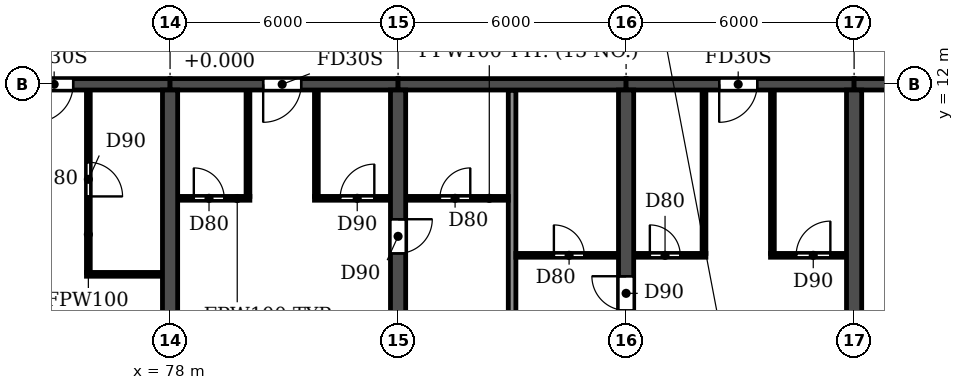
"""IFC4 building model, lengths in metres.
Left out: names, types, materials, properties, quantities, classifications, styles, units other than length and angle.
Written with IfcOpenShell. Run it as: python <this file> out.ifc"""

import sys

from ifc_helpers import new_model, si_unit, direction, frame, frame_2d, origin, place, context, subcontext, project, spatial, rectangle, extrude, element, fill, save


model = new_model("IFC4")
c1 = context("Model", 3, precision=1e-05, world=origin(), true_north=direction((0.0, 1.0)))
c2 = subcontext(c1, "Body", "Model", "MODEL_VIEW")
j1 = project(units=[si_unit("LENGTHUNIT", "METRE"), si_unit("PLANEANGLEUNIT", "RADIAN")], contexts=[c1])
p1 = place(None, origin())
s1 = spatial("IfcSite", under=j1, at=p1, CompositionType="ELEMENT")
p2 = place(p1, origin())
s2 = spatial("IfcBuilding", under=s1, at=p2, CompositionType="ELEMENT")
p3 = place(p2, frame((0.0, 0.0, 33.3)))
s3 = spatial("IfcBuildingStorey", under=s2, at=p3, CompositionType="ELEMENT", Elevation=33.3)
p4 = place(p3, frame((78.0, 0.2, 0.0), z_axis=(0.0, 0.0, 1.0), x_axis=(0.0, 1.0, 0.0)))
e1 = element("IfcWall", 1, at=p4, inside=s3, PredefinedType="SHEAR", context=c2, shape_type="SweptSolid", body=[
    extrude(rectangle(XDim=11.65, YDim=0.4, at=frame_2d((5.825, 0.0))), origin(), (0.0, 0.0, 1.0), 3.05),
])
p5 = place(p3, frame((84.0, 0.2, 0.0), z_axis=(0.0, 0.0, 1.0), x_axis=(0.0, 1.0, 0.0)))
e2 = element("IfcWall", 2, at=p5, inside=s3, PredefinedType="SHEAR", context=c2, shape_type="SweptSolid", body=[
    extrude(rectangle(XDim=11.65, YDim=0.4, at=frame_2d((5.825, 0.0))), origin(), (0.0, 0.0, 1.0), 3.05),
])
p6 = place(p5, frame((7.35, 0.0, 0.0)))
e3 = element("IfcOpeningElement", 3, at=p6, cuts=e2, PredefinedType="OPENING", context=c2, shape_type="SweptSolid", body=[
    extrude(rectangle(XDim=0.9, YDim=2.1, at=frame_2d((0.45, 1.05))), frame((0.0, 0.21, 0.0), z_axis=(0.0, -1.0, 0.0), x_axis=(1.0, 0.0, 0.0)), (0.0, 0.0, 1.0), 0.42),
])
p7 = place(p3, frame((90.0, 0.2, 0.0), z_axis=(0.0, 0.0, 1.0), x_axis=(0.0, 1.0, 0.0)))
e4 = element("IfcWall", 4, at=p7, inside=s3, PredefinedType="SHEAR", context=c2, shape_type="SweptSolid", body=[
    extrude(rectangle(XDim=11.65, YDim=0.4, at=frame_2d((5.825, 0.0))), origin(), (0.0, 0.0, 1.0), 3.05),
])
p8 = place(p7, frame((5.85, 0.0, 0.0)))
e5 = element("IfcOpeningElement", 5, at=p8, cuts=e4, PredefinedType="OPENING", context=c2, shape_type="SweptSolid", body=[
    extrude(rectangle(XDim=0.9, YDim=2.1, at=frame_2d((0.45, 1.05))), frame((0.0, 0.21, 0.0), z_axis=(0.0, -1.0, 0.0), x_axis=(1.0, 0.0, 0.0)), (0.0, 0.0, 1.0), 0.42),
])
p9 = place(p3, frame((96.0, 0.2, 0.0), z_axis=(0.0, 0.0, 1.0), x_axis=(0.0, 1.0, 0.0)))
e6 = element("IfcWall", 6, at=p9, inside=s3, PredefinedType="SHEAR", context=c2, shape_type="SweptSolid", body=[
    extrude(rectangle(XDim=11.65, YDim=0.4, at=frame_2d((5.825, 0.0))), origin(), (0.0, 0.0, 1.0), 3.05),
])
p10 = place(p3, frame((72.0, 12.0, 0.0), z_axis=(0.0, 0.0, 1.0), x_axis=(1.0, 0.0, 0.0)))
e7 = element("IfcWall", 7, at=p10, inside=s3, PredefinedType="SHEAR", context=c2, shape_type="SweptSolid", body=[
    extrude(rectangle(XDim=6.0, YDim=0.3, at=frame_2d((3.0, 0.0))), origin(), (0.0, 0.0, 1.0), 2.45),
])
p11 = place(p10, frame((2.45, 0.0, 0.0)))
e8 = element("IfcOpeningElement", 8, at=p11, cuts=e7, PredefinedType="OPENING", context=c2, shape_type="SweptSolid", body=[
    extrude(rectangle(XDim=1.0, YDim=2.1, at=frame_2d((0.5, 1.05))), frame((0.0, 0.16, 0.0), z_axis=(0.0, -1.0, 0.0), x_axis=(1.0, 0.0, 0.0)), (0.0, 0.0, 1.0), 0.32),
])
p12 = place(p3, frame((78.0, 12.0, 0.0), z_axis=(0.0, 0.0, 1.0), x_axis=(1.0, 0.0, 0.0)))
e9 = element("IfcWall", 9, at=p12, inside=s3, PredefinedType="SHEAR", context=c2, shape_type="SweptSolid", body=[
    extrude(rectangle(XDim=6.0, YDim=0.3, at=frame_2d((3.0, 0.0))), origin(), (0.0, 0.0, 1.0), 2.45),
])
p13 = place(p12, frame((2.45, 0.0, 0.0)))
e10 = element("IfcOpeningElement", 10, at=p13, cuts=e9, PredefinedType="OPENING", context=c2, shape_type="SweptSolid", body=[
    extrude(rectangle(XDim=1.0, YDim=2.1, at=frame_2d((0.5, 1.05))), frame((0.0, 0.16, 0.0), z_axis=(0.0, -1.0, 0.0), x_axis=(1.0, 0.0, 0.0)), (0.0, 0.0, 1.0), 0.32),
])
p14 = place(p3, frame((84.0, 12.0, 0.0), z_axis=(0.0, 0.0, 1.0), x_axis=(1.0, 0.0, 0.0)))
e11 = element("IfcWall", 11, at=p14, inside=s3, PredefinedType="SHEAR", context=c2, shape_type="SweptSolid", body=[
    extrude(rectangle(XDim=6.0, YDim=0.3, at=frame_2d((3.0, 0.0))), origin(), (0.0, 0.0, 1.0), 2.45),
])
p15 = place(p3, frame((90.0, 12.0, 0.0), z_axis=(0.0, 0.0, 1.0), x_axis=(1.0, 0.0, 0.0)))
e12 = element("IfcWall", 12, at=p15, inside=s3, PredefinedType="SHEAR", context=c2, shape_type="SweptSolid", body=[
    extrude(rectangle(XDim=6.0, YDim=0.3, at=frame_2d((3.0, 0.0))), origin(), (0.0, 0.0, 1.0), 2.45),
])
p16 = place(p15, frame((2.45, 0.0, 0.0)))
e13 = element("IfcOpeningElement", 13, at=p16, cuts=e12, PredefinedType="OPENING", context=c2, shape_type="SweptSolid", body=[
    extrude(rectangle(XDim=1.0, YDim=2.1, at=frame_2d((0.5, 1.05))), frame((0.0, 0.16, 0.0), z_axis=(0.0, -1.0, 0.0), x_axis=(1.0, 0.0, 0.0)), (0.0, 0.0, 1.0), 0.32),
])
p17 = place(p3, frame((96.0, 12.0, 0.0), z_axis=(0.0, 0.0, 1.0), x_axis=(1.0, 0.0, 0.0)))
e14 = element("IfcWall", 14, at=p17, inside=s3, PredefinedType="SHEAR", context=c2, shape_type="SweptSolid", body=[
    extrude(rectangle(XDim=5.8, YDim=0.3, at=frame_2d((2.9, 0.0))), origin(), (0.0, 0.0, 1.0), 2.45),
])
p18 = place(p17, frame((2.5, 0.0, 0.0)))
e15 = element("IfcOpeningElement", 15, at=p18, cuts=e14, PredefinedType="OPENING", context=c2, shape_type="SweptSolid", body=[
    extrude(rectangle(XDim=1.0, YDim=2.1, at=frame_2d((0.5, 1.05))), frame((0.0, 0.16, 0.0), z_axis=(0.0, -1.0, 0.0), x_axis=(1.0, 0.0, 0.0)), (0.0, 0.0, 1.0), 0.32),
])
p19 = place(p3, frame((87.0, 0.06, 0.0), z_axis=(0.0, 0.0, 1.0), x_axis=(0.0, 1.0, 0.0)))
e16 = element("IfcWall", 16, at=p19, inside=s3, PredefinedType="PARTITIONING", context=c2, shape_type="SweptSolid", body=[
    extrude(rectangle(XDim=11.78, YDim=0.2, at=frame_2d((5.89, 0.0))), origin(), (0.0, 0.0, 1.0), 3.05),
])
p20 = place(p3, frame((75.8, 7.0, 0.0), z_axis=(0.0, 0.0, 1.0), x_axis=(1.0, 0.0, 0.0)))
e17 = element("IfcWall", 17, at=p20, inside=s3, PredefinedType="PARTITIONING", context=c2, shape_type="SweptSolid", body=[
    extrude(rectangle(XDim=1.99, YDim=0.1, at=frame_2d((0.995, 0.0))), origin(), (0.0, 0.0, 1.0), 3.05),
])
p21 = place(p3, frame((87.1, 7.5, 0.0), z_axis=(0.0, 0.0, 1.0), x_axis=(1.0, 0.0, 0.0)))
e18 = element("IfcWall", 18, at=p21, inside=s3, PredefinedType="PARTITIONING", context=c2, shape_type="SweptSolid", body=[
    extrude(rectangle(XDim=2.69, YDim=0.1, at=frame_2d((1.345, 0.0))), origin(), (0.0, 0.0, 1.0), 3.05),
])
p22 = place(p21, frame((1.0, 0.0, 0.0)))
e19 = element("IfcOpeningElement", 19, at=p22, cuts=e18, PredefinedType="OPENING", context=c2, shape_type="SweptSolid", body=[
    extrude(rectangle(XDim=0.8, YDim=2.1, at=frame_2d((0.4, 1.05))), frame((0.0, 0.06, 0.0), z_axis=(0.0, -1.0, 0.0), x_axis=(1.0, 0.0, 0.0)), (0.0, 0.0, 1.0), 0.12),
])
p23 = place(p3, frame((90.21, 7.5, 0.0), z_axis=(0.0, 0.0, 1.0), x_axis=(1.0, 0.0, 0.0)))
e20 = element("IfcWall", 20, at=p23, inside=s3, PredefinedType="PARTITIONING", context=c2, shape_type="SweptSolid", body=[
    extrude(rectangle(XDim=1.89, YDim=0.1, at=frame_2d((0.945, 0.0))), origin(), (0.0, 0.0, 1.0), 3.05),
])
p24 = place(p23, frame((0.415, 0.0, 0.0)))
e21 = element("IfcOpeningElement", 21, at=p24, cuts=e20, PredefinedType="OPENING", context=c2, shape_type="SweptSolid", body=[
    extrude(rectangle(XDim=0.8, YDim=2.1, at=frame_2d((0.4, 1.05))), frame((0.0, 0.06, 0.0), z_axis=(0.0, -1.0, 0.0), x_axis=(1.0, 0.0, 0.0)), (0.0, 0.0, 1.0), 0.12),
])
p25 = place(p3, frame((93.8, 7.5, 0.0), z_axis=(0.0, 0.0, 1.0), x_axis=(1.0, 0.0, 0.0)))
e22 = element("IfcWall", 22, at=p25, inside=s3, PredefinedType="PARTITIONING", context=c2, shape_type="SweptSolid", body=[
    extrude(rectangle(XDim=1.99, YDim=0.1, at=frame_2d((0.995, 0.0))), origin(), (0.0, 0.0, 1.0), 3.05),
])
p26 = place(p25, frame((0.675, 0.0, 0.0)))
e23 = element("IfcOpeningElement", 23, at=p26, cuts=e22, PredefinedType="OPENING", context=c2, shape_type="SweptSolid", body=[
    extrude(rectangle(XDim=0.9, YDim=2.1, at=frame_2d((0.45, 1.05))), frame((0.0, 0.06, 0.0), z_axis=(0.0, -1.0, 0.0), x_axis=(1.0, 0.0, 0.0)), (0.0, 0.0, 1.0), 0.12),
])
p27 = place(p3, frame((78.21, 9.0, 0.0), z_axis=(0.0, 0.0, 1.0), x_axis=(1.0, 0.0, 0.0)))
e24 = element("IfcWall", 24, at=p27, inside=s3, PredefinedType="PARTITIONING", context=c2, shape_type="SweptSolid", body=[
    extrude(rectangle(XDim=1.89, YDim=0.1, at=frame_2d((0.945, 0.0))), origin(), (0.0, 0.0, 1.0), 3.05),
])
p28 = place(p27, frame((0.415, 0.0, 0.0)))
e25 = element("IfcOpeningElement", 25, at=p28, cuts=e24, PredefinedType="OPENING", context=c2, shape_type="SweptSolid", body=[
    extrude(rectangle(XDim=0.8, YDim=2.1, at=frame_2d((0.4, 1.05))), frame((0.0, 0.06, 0.0), z_axis=(0.0, -1.0, 0.0), x_axis=(1.0, 0.0, 0.0)), (0.0, 0.0, 1.0), 0.12),
])
p29 = place(p3, frame((81.8, 9.0, 0.0), z_axis=(0.0, 0.0, 1.0), x_axis=(1.0, 0.0, 0.0)))
e26 = element("IfcWall", 26, at=p29, inside=s3, PredefinedType="PARTITIONING", context=c2, shape_type="SweptSolid", body=[
    extrude(rectangle(XDim=1.99, YDim=0.1, at=frame_2d((0.995, 0.0))), origin(), (0.0, 0.0, 1.0), 3.05),
])
p30 = place(p29, frame((0.675, 0.0, 0.0)))
e27 = element("IfcOpeningElement", 27, at=p30, cuts=e26, PredefinedType="OPENING", context=c2, shape_type="SweptSolid", body=[
    extrude(rectangle(XDim=0.9, YDim=2.1, at=frame_2d((0.45, 1.05))), frame((0.0, 0.06, 0.0), z_axis=(0.0, -1.0, 0.0), x_axis=(1.0, 0.0, 0.0)), (0.0, 0.0, 1.0), 0.12),
])
p31 = place(p3, frame((84.21, 9.0, 0.0), z_axis=(0.0, 0.0, 1.0), x_axis=(1.0, 0.0, 0.0)))
e28 = element("IfcWall", 28, at=p31, inside=s3, PredefinedType="PARTITIONING", context=c2, shape_type="SweptSolid", body=[
    extrude(rectangle(XDim=2.69, YDim=0.1, at=frame_2d((1.345, 0.0))), origin(), (0.0, 0.0, 1.0), 3.05),
])
p32 = place(p31, frame((0.89, 0.0, 0.0)))
e29 = element("IfcOpeningElement", 29, at=p32, cuts=e28, PredefinedType="OPENING", context=c2, shape_type="SweptSolid", body=[
    extrude(rectangle(XDim=0.8, YDim=2.1, at=frame_2d((0.4, 1.05))), frame((0.0, 0.06, 0.0), z_axis=(0.0, -1.0, 0.0), x_axis=(1.0, 0.0, 0.0)), (0.0, 0.0, 1.0), 0.12),
])
p33 = place(p3, frame((75.85, 7.05, 0.0), z_axis=(0.0, 0.0, 1.0), x_axis=(0.0, 1.0, 0.0)))
e30 = element("IfcWall", 30, at=p33, inside=s3, PredefinedType="PARTITIONING", context=c2, shape_type="SweptSolid", body=[
    extrude(rectangle(XDim=4.79, YDim=0.1, at=frame_2d((2.395, 0.0))), origin(), (0.0, 0.0, 1.0), 3.05),
])
p34 = place(p33, frame((2.0, 0.0, 0.0)))
e31 = element("IfcOpeningElement", 31, at=p34, cuts=e30, PredefinedType="OPENING", context=c2, shape_type="SweptSolid", body=[
    extrude(rectangle(XDim=0.9, YDim=2.1, at=frame_2d((0.45, 1.05))), frame((0.0, 0.06, 0.0), z_axis=(0.0, -1.0, 0.0), x_axis=(1.0, 0.0, 0.0)), (0.0, 0.0, 1.0), 0.12),
])
for number, where, z_axis, x_axis in (
    (32, (80.05, 9.05, 0.0), (0.0, 0.0, 1.0), (0.0, 1.0, 0.0)),
    (33, (81.85, 9.05, 0.0), (0.0, 0.0, 1.0), (0.0, 1.0, 0.0)),
):
    element("IfcWall", number, at=place(p3, frame(where, z_axis=z_axis, x_axis=x_axis)), inside=s3, PredefinedType="PARTITIONING", context=c2, shape_type="SweptSolid", body=[
        extrude(rectangle(XDim=2.79, YDim=0.1, at=frame_2d((1.395, 0.0))), origin(), (0.0, 0.0, 1.0), 3.05),
    ])
for number, where, z_axis, x_axis in (
    (34, (92.05, 7.55, 0.0), (0.0, 0.0, 1.0), (0.0, 1.0, 0.0)),
    (35, (93.85, 7.55, 0.0), (0.0, 0.0, 1.0), (0.0, 1.0, 0.0)),
):
    element("IfcWall", number, at=place(p3, frame(where, z_axis=z_axis, x_axis=x_axis)), inside=s3, PredefinedType="PARTITIONING", context=c2, shape_type="SweptSolid", body=[
        extrude(rectangle(XDim=4.29, YDim=0.1, at=frame_2d((2.145, 0.0))), origin(), (0.0, 0.0, 1.0), 3.05),
    ])
p35 = place(p11, frame((1.0, 0.0, 0.0), z_axis=(0.0, 0.0, 1.0), x_axis=(-1.0, 0.0, 0.0)))
e36 = element("IfcDoor", 36, at=p35, inside=s3, OperationType="SINGLE_SWING_RIGHT", PredefinedType="DOOR", context=c2, shape_type="SweptSolid", body=[
    extrude(rectangle(XDim=1.0, YDim=2.1, at=frame_2d((0.5, 1.05))), frame((0.0, 0.025, 0.0), z_axis=(0.0, -1.0, 0.0), x_axis=(1.0, 0.0, 0.0)), (0.0, 0.0, 1.0), 0.05),
])
fill(e8, e36)
p36 = place(p34, frame((0.9, 0.0, 0.0), z_axis=(0.0, 0.0, 1.0), x_axis=(-1.0, 0.0, 0.0)))
e37 = element("IfcDoor", 37, at=p36, inside=s3, OperationType="SINGLE_SWING_RIGHT", PredefinedType="DOOR", context=c2, shape_type="SweptSolid", body=[
    extrude(rectangle(XDim=0.9, YDim=2.1, at=frame_2d((0.45, 1.05))), frame((0.0, 0.025, 0.0), z_axis=(0.0, -1.0, 0.0), x_axis=(1.0, 0.0, 0.0)), (0.0, 0.0, 1.0), 0.05),
])
fill(e31, e37)
p37 = place(p32, origin())
e38 = element("IfcDoor", 38, at=p37, inside=s3, OperationType="SINGLE_SWING_RIGHT", PredefinedType="DOOR", context=c2, shape_type="SweptSolid", body=[
    extrude(rectangle(XDim=0.8, YDim=2.1, at=frame_2d((0.4, 1.05))), frame((0.0, 0.025, 0.0), z_axis=(0.0, -1.0, 0.0), x_axis=(1.0, 0.0, 0.0)), (0.0, 0.0, 1.0), 0.05),
])
fill(e29, e38)
p38 = place(p28, origin())
e39 = element("IfcDoor", 39, at=p38, inside=s3, OperationType="SINGLE_SWING_LEFT", PredefinedType="DOOR", context=c2, shape_type="SweptSolid", body=[
    extrude(rectangle(XDim=0.8, YDim=2.1, at=frame_2d((0.4, 1.05))), frame((0.0, 0.025, 0.0), z_axis=(0.0, -1.0, 0.0), x_axis=(1.0, 0.0, 0.0)), (0.0, 0.0, 1.0), 0.05),
])
fill(e25, e39)
p39 = place(p13, frame((1.0, 0.0, 0.0), z_axis=(0.0, 0.0, 1.0), x_axis=(-1.0, 0.0, 0.0)))
e40 = element("IfcDoor", 40, at=p39, inside=s3, OperationType="SINGLE_SWING_RIGHT", PredefinedType="DOOR", context=c2, shape_type="SweptSolid", body=[
    extrude(rectangle(XDim=1.0, YDim=2.1, at=frame_2d((0.5, 1.05))), frame((0.0, 0.025, 0.0), z_axis=(0.0, -1.0, 0.0), x_axis=(1.0, 0.0, 0.0)), (0.0, 0.0, 1.0), 0.05),
])
fill(e10, e40)
p40 = place(p30, origin())
e41 = element("IfcDoor", 41, at=p40, inside=s3, OperationType="SINGLE_SWING_RIGHT", PredefinedType="DOOR", context=c2, shape_type="SweptSolid", body=[
    extrude(rectangle(XDim=0.9, YDim=2.1, at=frame_2d((0.45, 1.05))), frame((0.0, 0.025, 0.0), z_axis=(0.0, -1.0, 0.0), x_axis=(1.0, 0.0, 0.0)), (0.0, 0.0, 1.0), 0.05),
])
fill(e27, e41)
p41 = place(p6, frame((0.9, 0.0, 0.0), z_axis=(0.0, 0.0, 1.0), x_axis=(-1.0, 0.0, 0.0)))
e42 = element("IfcDoor", 42, at=p41, inside=s3, OperationType="SINGLE_SWING_LEFT", PredefinedType="DOOR", context=c2, shape_type="SweptSolid", body=[
    extrude(rectangle(XDim=0.9, YDim=2.1, at=frame_2d((0.45, 1.05))), frame((0.0, 0.025, 0.0), z_axis=(0.0, -1.0, 0.0), x_axis=(1.0, 0.0, 0.0)), (0.0, 0.0, 1.0), 0.05),
])
fill(e3, e42)
p42 = place(p22, origin())
e43 = element("IfcDoor", 43, at=p42, inside=s3, OperationType="SINGLE_SWING_LEFT", PredefinedType="DOOR", context=c2, shape_type="SweptSolid", body=[
    extrude(rectangle(XDim=0.8, YDim=2.1, at=frame_2d((0.4, 1.05))), frame((0.0, 0.025, 0.0), z_axis=(0.0, -1.0, 0.0), x_axis=(1.0, 0.0, 0.0)), (0.0, 0.0, 1.0), 0.05),
])
fill(e19, e43)
p43 = place(p8, origin())
e44 = element("IfcDoor", 44, at=p43, inside=s3, OperationType="SINGLE_SWING_RIGHT", PredefinedType="DOOR", context=c2, shape_type="SweptSolid", body=[
    extrude(rectangle(XDim=0.9, YDim=2.1, at=frame_2d((0.45, 1.05))), frame((0.0, 0.025, 0.0), z_axis=(0.0, -1.0, 0.0), x_axis=(1.0, 0.0, 0.0)), (0.0, 0.0, 1.0), 0.05),
])
fill(e5, e44)
p44 = place(p24, origin())
e45 = element("IfcDoor", 45, at=p44, inside=s3, OperationType="SINGLE_SWING_LEFT", PredefinedType="DOOR", context=c2, shape_type="SweptSolid", body=[
    extrude(rectangle(XDim=0.8, YDim=2.1, at=frame_2d((0.4, 1.05))), frame((0.0, 0.025, 0.0), z_axis=(0.0, -1.0, 0.0), x_axis=(1.0, 0.0, 0.0)), (0.0, 0.0, 1.0), 0.05),
])
fill(e21, e45)
p45 = place(p16, frame((1.0, 0.0, 0.0), z_axis=(0.0, 0.0, 1.0), x_axis=(-1.0, 0.0, 0.0)))
e46 = element("IfcDoor", 46, at=p45, inside=s3, OperationType="SINGLE_SWING_RIGHT", PredefinedType="DOOR", context=c2, shape_type="SweptSolid", body=[
    extrude(rectangle(XDim=1.0, YDim=2.1, at=frame_2d((0.5, 1.05))), frame((0.0, 0.025, 0.0), z_axis=(0.0, -1.0, 0.0), x_axis=(1.0, 0.0, 0.0)), (0.0, 0.0, 1.0), 0.05),
])
fill(e13, e46)
p46 = place(p26, origin())
e47 = element("IfcDoor", 47, at=p46, inside=s3, OperationType="SINGLE_SWING_RIGHT", PredefinedType="DOOR", context=c2, shape_type="SweptSolid", body=[
    extrude(rectangle(XDim=0.9, YDim=2.1, at=frame_2d((0.45, 1.05))), frame((0.0, 0.025, 0.0), z_axis=(0.0, -1.0, 0.0), x_axis=(1.0, 0.0, 0.0)), (0.0, 0.0, 1.0), 0.05),
])
fill(e23, e47)
save(model, sys.argv[1])
